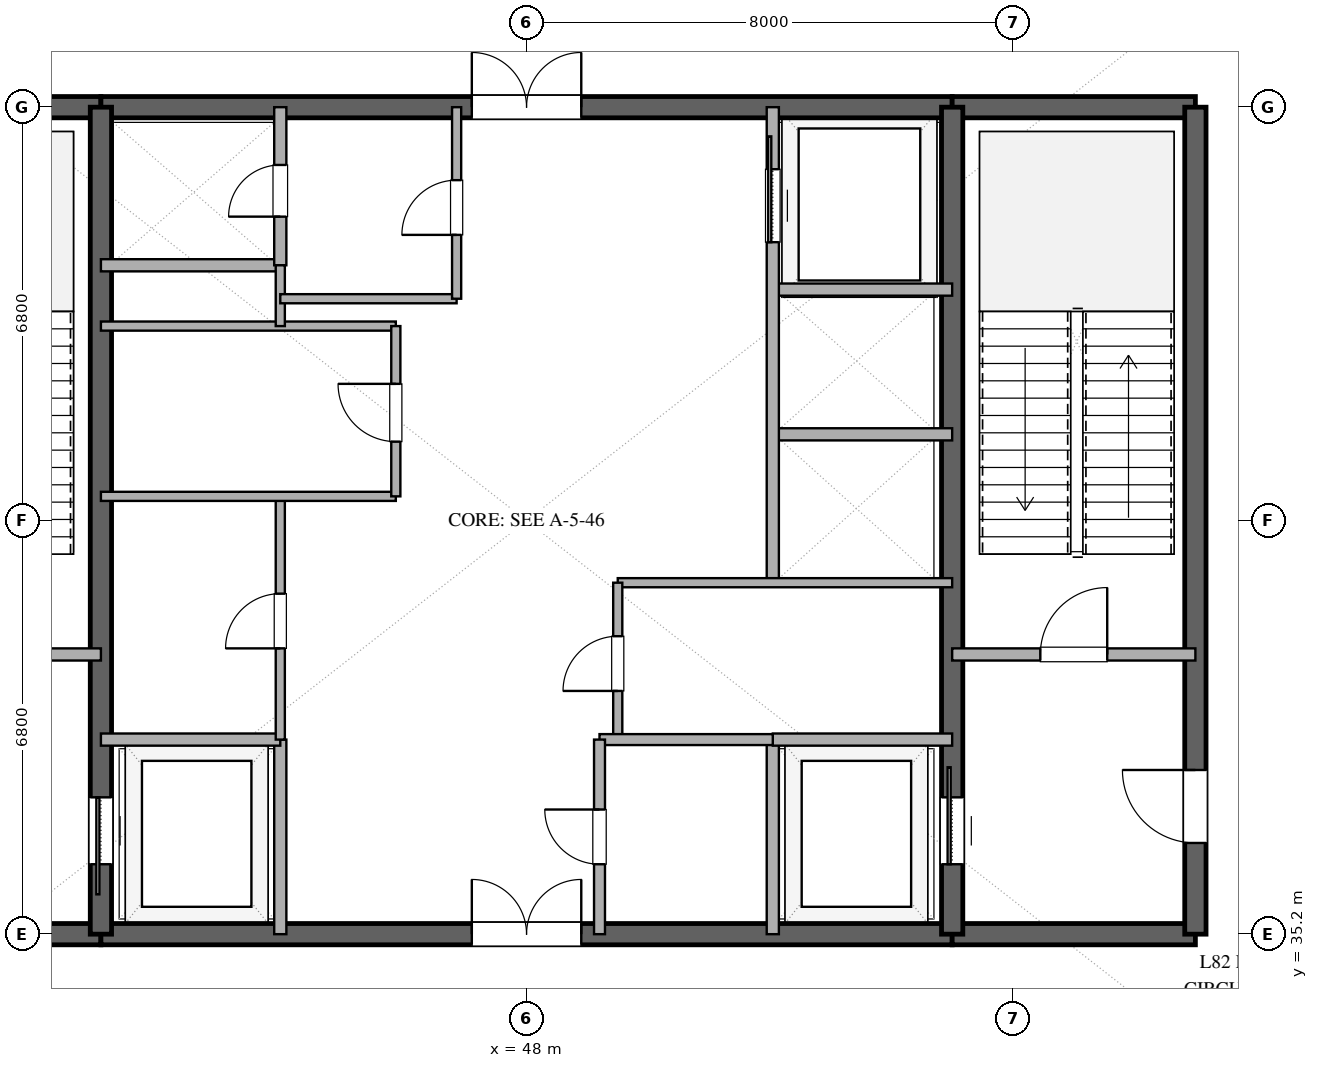
"""IFC4 building model, lengths in metres.
Left out: names, types, materials, properties, quantities, classifications, styles, units other than length and angle.
Written with IfcOpenShell. Run it as: python <this file> out.ifc"""

import sys

from ifc_helpers import new_model, si_unit, direction, frame, frame_2d, origin, place, context, subcontext, project, spatial, rectangle, extrude, element, fill, save


model = new_model("IFC4")
c1 = context("Model", 3, precision=1e-05, world=origin(), true_north=direction((0.0, 1.0)))
c2 = subcontext(c1, "Body", "Model", "MODEL_VIEW")
j1 = project(units=[si_unit("LENGTHUNIT", "METRE"), si_unit("PLANEANGLEUNIT", "RADIAN")], contexts=[c1])
p1 = place(None, origin())
s1 = spatial("IfcSite", under=j1, at=p1, CompositionType="ELEMENT")
p2 = place(p1, origin())
s2 = spatial("IfcBuilding", under=s1, at=p2, CompositionType="ELEMENT")
p3 = place(p2, frame((0.0, 0.0, 316.5)))
s3 = spatial("IfcBuildingStorey", under=s2, at=p3, CompositionType="ELEMENT", Elevation=316.5)
p4 = place(p3, frame((37.0, 35.2, 0.0), z_axis=(0.0, 0.0, 1.0), x_axis=(1.0, 0.0, 0.0)))
e1 = element("IfcWall", 1, at=p4, inside=s3, PredefinedType="SHEAR", context=c2, shape_type="SweptSolid", body=[
    extrude(rectangle(XDim=4.0, YDim=0.35, at=frame_2d((2.0, 0.0))), origin(), (0.0, 0.0, 1.0), 4.84),
])
p5 = place(p3, frame((41.0, 35.2, 0.0), z_axis=(0.0, 0.0, 1.0), x_axis=(1.0, 0.0, 0.0)))
e2 = element("IfcWall", 2, at=p5, inside=s3, PredefinedType="SHEAR", context=c2, shape_type="SweptSolid", body=[
    extrude(rectangle(XDim=14.0, YDim=0.35, at=frame_2d((7.0, 0.0))), origin(), (0.0, 0.0, 1.0), 4.84),
])
p6 = place(p5, frame((6.1, 0.0, 0.0)))
e3 = element("IfcOpeningElement", 3, at=p6, cuts=e2, PredefinedType="OPENING", context=c2, shape_type="SweptSolid", body=[
    extrude(rectangle(XDim=1.8, YDim=2.25, at=frame_2d((0.9, 1.125))), frame((0.0, 0.185, 0.0), z_axis=(0.0, -1.0, 0.0), x_axis=(1.0, 0.0, 0.0)), (0.0, 0.0, 1.0), 0.37),
])
for number, where, z_axis, x_axis in (
    (4, (55.0, 35.2, 0.0), (0.0, 0.0, 1.0), (1.0, 0.0, 0.0)),
    (5, (37.0, 48.8, 0.0), (0.0, 0.0, 1.0), (1.0, 0.0, 0.0)),
):
    element("IfcWall", number, at=place(p3, frame(where, z_axis=z_axis, x_axis=x_axis)), inside=s3, PredefinedType="SHEAR", context=c2, shape_type="SweptSolid", body=[
        extrude(rectangle(XDim=4.0, YDim=0.35, at=frame_2d((2.0, 0.0))), origin(), (0.0, 0.0, 1.0), 4.84),
    ])
p7 = place(p3, frame((41.0, 48.8, 0.0), z_axis=(0.0, 0.0, 1.0), x_axis=(1.0, 0.0, 0.0)))
e6 = element("IfcWall", 6, at=p7, inside=s3, PredefinedType="SHEAR", context=c2, shape_type="SweptSolid", body=[
    extrude(rectangle(XDim=14.0, YDim=0.35, at=frame_2d((7.0, 0.0))), origin(), (0.0, 0.0, 1.0), 4.84),
])
p8 = place(p7, frame((6.1, 0.0, 0.0)))
e7 = element("IfcOpeningElement", 7, at=p8, cuts=e6, PredefinedType="OPENING", context=c2, shape_type="SweptSolid", body=[
    extrude(rectangle(XDim=1.8, YDim=2.25, at=frame_2d((0.9, 1.125))), frame((0.0, 0.185, 0.0), z_axis=(0.0, -1.0, 0.0), x_axis=(1.0, 0.0, 0.0)), (0.0, 0.0, 1.0), 0.37),
])
p9 = place(p3, frame((55.0, 48.8, 0.0), z_axis=(0.0, 0.0, 1.0), x_axis=(1.0, 0.0, 0.0)))
e8 = element("IfcWall", 8, at=p9, inside=s3, PredefinedType="SHEAR", context=c2, shape_type="SweptSolid", body=[
    extrude(rectangle(XDim=4.0, YDim=0.35, at=frame_2d((2.0, 0.0))), origin(), (0.0, 0.0, 1.0), 4.84),
])
p10 = place(p3, frame((59.0, 35.2, 0.0), z_axis=(0.0, 0.0, 1.0), x_axis=(0.0, 1.0, 0.0)))
e9 = element("IfcWall", 9, at=p10, inside=s3, PredefinedType="SHEAR", context=c2, shape_type="SweptSolid", body=[
    extrude(rectangle(XDim=13.6, YDim=0.35, at=frame_2d((6.8, 0.0))), origin(), (0.0, 0.0, 1.0), 4.84),
])
p11 = place(p10, frame((1.5, 0.0, 0.0)))
e10 = element("IfcOpeningElement", 10, at=p11, cuts=e9, PredefinedType="OPENING", context=c2, shape_type="SweptSolid", body=[
    extrude(rectangle(XDim=1.2, YDim=2.15, at=frame_2d((0.6, 1.075))), frame((0.0, 0.185, 0.0), z_axis=(0.0, -1.0, 0.0), x_axis=(1.0, 0.0, 0.0)), (0.0, 0.0, 1.0), 0.37),
])
p12 = place(p3, frame((41.0, 35.2, 0.0), z_axis=(0.0, 0.0, 1.0), x_axis=(0.0, 1.0, 0.0)))
e11 = element("IfcWall", 11, at=p12, inside=s3, PredefinedType="SHEAR", context=c2, shape_type="SweptSolid", body=[
    extrude(rectangle(XDim=13.6, YDim=0.35, at=frame_2d((6.8, 0.0))), origin(), (0.0, 0.0, 1.0), 4.84),
])
p13 = place(p12, frame((1.15, 0.0, 0.0)))
e12 = element("IfcOpeningElement", 12, at=p13, cuts=e11, PredefinedType="OPENING", context=c2, shape_type="SweptSolid", body=[
    extrude(rectangle(XDim=1.1, YDim=2.2, at=frame_2d((0.55, 1.1))), frame((0.0, 0.185, 0.0), z_axis=(0.0, -1.0, 0.0), x_axis=(1.0, 0.0, 0.0)), (0.0, 0.0, 1.0), 0.37),
])
p14 = place(p3, frame((55.0, 35.2, 0.0), z_axis=(0.0, 0.0, 1.0), x_axis=(0.0, 1.0, 0.0)))
e13 = element("IfcWall", 13, at=p14, inside=s3, PredefinedType="SHEAR", context=c2, shape_type="SweptSolid", body=[
    extrude(rectangle(XDim=13.6, YDim=0.35, at=frame_2d((6.8, 0.0))), origin(), (0.0, 0.0, 1.0), 4.84),
])
p15 = place(p14, frame((1.15, 0.0, 0.0)))
e14 = element("IfcOpeningElement", 14, at=p15, cuts=e13, PredefinedType="OPENING", context=c2, shape_type="SweptSolid", body=[
    extrude(rectangle(XDim=1.1, YDim=2.2, at=frame_2d((0.55, 1.1))), frame((0.0, 0.185, 0.0), z_axis=(0.0, -1.0, 0.0), x_axis=(1.0, 0.0, 0.0)), (0.0, 0.0, 1.0), 0.37),
])
p16 = place(p3, frame((37.0, 39.8, 0.0), z_axis=(0.0, 0.0, 1.0), x_axis=(1.0, 0.0, 0.0)))
e15 = element("IfcWall", 15, at=p16, inside=s3, PredefinedType="SOLIDWALL", context=c2, shape_type="SweptSolid", body=[
    extrude(rectangle(XDim=4.0, YDim=0.2, at=frame_2d((2.0, 0.0))), origin(), (0.0, 0.0, 1.0), 4.19),
])
p17 = place(p16, frame((1.45, 0.0, 0.0)))
e16 = element("IfcOpeningElement", 16, at=p17, cuts=e15, PredefinedType="OPENING", context=c2, shape_type="SweptSolid", body=[
    extrude(rectangle(XDim=1.1, YDim=2.15, at=frame_2d((0.55, 1.075))), frame((0.0, 0.11, 0.0), z_axis=(0.0, -1.0, 0.0), x_axis=(1.0, 0.0, 0.0)), (0.0, 0.0, 1.0), 0.22),
])
p18 = place(p3, frame((55.0, 39.8, 0.0), z_axis=(0.0, 0.0, 1.0), x_axis=(1.0, 0.0, 0.0)))
e17 = element("IfcWall", 17, at=p18, inside=s3, PredefinedType="SOLIDWALL", context=c2, shape_type="SweptSolid", body=[
    extrude(rectangle(XDim=4.0, YDim=0.2, at=frame_2d((2.0, 0.0))), origin(), (0.0, 0.0, 1.0), 4.19),
])
p19 = place(p18, frame((1.45, 0.0, 0.0)))
e18 = element("IfcOpeningElement", 18, at=p19, cuts=e17, PredefinedType="OPENING", context=c2, shape_type="SweptSolid", body=[
    extrude(rectangle(XDim=1.1, YDim=2.15, at=frame_2d((0.55, 1.075))), frame((0.0, 0.11, 0.0), z_axis=(0.0, -1.0, 0.0), x_axis=(1.0, 0.0, 0.0)), (0.0, 0.0, 1.0), 0.22),
])
p20 = place(p3, frame((43.95, 35.2, 0.0), z_axis=(0.0, 0.0, 1.0), x_axis=(0.0, 1.0, 0.0)))
e19 = element("IfcWall", 19, at=p20, inside=s3, PredefinedType="SOLIDWALL", context=c2, shape_type="SweptSolid", body=[
    extrude(rectangle(XDim=3.2, YDim=0.2, at=frame_2d((1.6, 0.0))), origin(), (0.0, 0.0, 1.0), 4.19),
])
p21 = place(p3, frame((41.0, 38.4, 0.0), z_axis=(0.0, 0.0, 1.0), x_axis=(1.0, 0.0, 0.0)))
e20 = element("IfcWall", 20, at=p21, inside=s3, PredefinedType="SOLIDWALL", context=c2, shape_type="SweptSolid", body=[
    extrude(rectangle(XDim=2.95, YDim=0.2, at=frame_2d((1.475, 0.0))), origin(), (0.0, 0.0, 1.0), 4.19),
])
p22 = place(p3, frame((52.05, 35.2, 0.0), z_axis=(0.0, 0.0, 1.0), x_axis=(0.0, 1.0, 0.0)))
e21 = element("IfcWall", 21, at=p22, inside=s3, PredefinedType="SOLIDWALL", context=c2, shape_type="SweptSolid", body=[
    extrude(rectangle(XDim=3.2, YDim=0.2, at=frame_2d((1.6, 0.0))), origin(), (0.0, 0.0, 1.0), 4.19),
])
for number, where, z_axis, x_axis in (
    (22, (52.05, 38.4, 0.0), (0.0, 0.0, 1.0), (1.0, 0.0, 0.0)),
    (23, (41.0, 46.2, 0.0), (0.0, 0.0, 1.0), (1.0, 0.0, 0.0)),
):
    element("IfcWall", number, at=place(p3, frame(where, z_axis=z_axis, x_axis=x_axis)), inside=s3, PredefinedType="SOLIDWALL", context=c2, shape_type="SweptSolid", body=[
        extrude(rectangle(XDim=2.95, YDim=0.2, at=frame_2d((1.475, 0.0))), origin(), (0.0, 0.0, 1.0), 4.19),
    ])
p23 = place(p3, frame((43.95, 46.2, 0.0), z_axis=(0.0, 0.0, 1.0), x_axis=(0.0, 1.0, 0.0)))
e24 = element("IfcWall", 24, at=p23, inside=s3, PredefinedType="SOLIDWALL", context=c2, shape_type="SweptSolid", body=[
    extrude(rectangle(XDim=2.6, YDim=0.2, at=frame_2d((1.3, 0.0))), origin(), (0.0, 0.0, 1.0), 4.19),
])
p24 = place(p23, frame((0.8, 0.0, 0.0)))
e25 = element("IfcOpeningElement", 25, at=p24, cuts=e24, PredefinedType="OPENING", context=c2, shape_type="SweptSolid", body=[
    extrude(rectangle(XDim=0.85, YDim=2.15, at=frame_2d((0.425, 1.075))), frame((0.0, 0.11, 0.0), z_axis=(0.0, -1.0, 0.0), x_axis=(1.0, 0.0, 0.0)), (0.0, 0.0, 1.0), 0.22),
])
p25 = place(p3, frame((43.95, 38.4, 0.0), z_axis=(0.0, 0.0, 1.0), x_axis=(0.0, 1.0, 0.0)))
e26 = element("IfcWall", 26, at=p25, inside=s3, PredefinedType="PARTITIONING", context=c2, shape_type="SweptSolid", body=[
    extrude(rectangle(XDim=4.0, YDim=0.15, at=frame_2d((2.0, 0.0))), origin(), (0.0, 0.0, 1.0), 4.19),
])
p26 = place(p25, frame((1.5, 0.0, 0.0)))
e27 = element("IfcOpeningElement", 27, at=p26, cuts=e26, PredefinedType="OPENING", context=c2, shape_type="SweptSolid", body=[
    extrude(rectangle(XDim=0.9, YDim=2.15, at=frame_2d((0.45, 1.075))), frame((0.0, 0.085, 0.0), z_axis=(0.0, -1.0, 0.0), x_axis=(1.0, 0.0, 0.0)), (0.0, 0.0, 1.0), 0.17),
])
for number, where, z_axis, x_axis in (
    (28, (41.0, 42.4, 0.0), (0.0, 0.0, 1.0), (1.0, 0.0, 0.0)),
    (29, (41.0, 45.2, 0.0), (0.0, 0.0, 1.0), (1.0, 0.0, 0.0)),
):
    element("IfcWall", number, at=place(p3, frame(where, z_axis=z_axis, x_axis=x_axis)), inside=s3, PredefinedType="PARTITIONING", context=c2, shape_type="SweptSolid", body=[
        extrude(rectangle(XDim=4.85, YDim=0.15, at=frame_2d((2.425, 0.0))), origin(), (0.0, 0.0, 1.0), 4.19),
    ])
p27 = place(p3, frame((43.95, 45.2, 0.0), z_axis=(0.0, 0.0, 1.0), x_axis=(0.0, 1.0, 0.0)))
e30 = element("IfcWall", 30, at=p27, inside=s3, PredefinedType="PARTITIONING", context=c2, shape_type="SweptSolid", body=[
    extrude(rectangle(XDim=1.0, YDim=0.15, at=frame_2d((0.5, 0.0))), origin(), (0.0, 0.0, 1.0), 4.19),
])
p28 = place(p3, frame((45.85, 42.4, 0.0), z_axis=(0.0, 0.0, 1.0), x_axis=(0.0, 1.0, 0.0)))
e31 = element("IfcWall", 31, at=p28, inside=s3, PredefinedType="PARTITIONING", context=c2, shape_type="SweptSolid", body=[
    extrude(rectangle(XDim=2.8, YDim=0.15, at=frame_2d((1.4, 0.0))), origin(), (0.0, 0.0, 1.0), 4.19),
])
p29 = place(p28, frame((0.9, 0.0, 0.0)))
e32 = element("IfcOpeningElement", 32, at=p29, cuts=e31, PredefinedType="OPENING", context=c2, shape_type="SweptSolid", body=[
    extrude(rectangle(XDim=0.95, YDim=2.15, at=frame_2d((0.475, 1.075))), frame((0.0, 0.085, 0.0), z_axis=(0.0, -1.0, 0.0), x_axis=(1.0, 0.0, 0.0)), (0.0, 0.0, 1.0), 0.17),
])
for number, where, z_axis, x_axis in (
    (33, (52.05, 43.42, 0.0), (0.0, 0.0, 1.0), (1.0, 0.0, 0.0)),
    (34, (52.05, 45.8, 0.0), (0.0, 0.0, 1.0), (1.0, 0.0, 0.0)),
):
    element("IfcWall", number, at=place(p3, frame(where, z_axis=z_axis, x_axis=x_axis)), inside=s3, PredefinedType="SOLIDWALL", context=c2, shape_type="SweptSolid", body=[
        extrude(rectangle(XDim=2.95, YDim=0.2, at=frame_2d((1.475, 0.0))), origin(), (0.0, 0.0, 1.0), 4.19),
    ])
p30 = place(p3, frame((52.05, 40.98, 0.0), z_axis=(0.0, 0.0, 1.0), x_axis=(0.0, 1.0, 0.0)))
e35 = element("IfcWall", 35, at=p30, inside=s3, PredefinedType="SOLIDWALL", context=c2, shape_type="SweptSolid", body=[
    extrude(rectangle(XDim=7.82, YDim=0.2, at=frame_2d((3.91, 0.0))), origin(), (0.0, 0.0, 1.0), 4.19),
])
p31 = place(p30, frame((5.6, 0.0, 0.0)))
e36 = element("IfcOpeningElement", 36, at=p31, cuts=e35, PredefinedType="OPENING", context=c2, shape_type="SweptSolid", body=[
    extrude(rectangle(XDim=1.2, YDim=2.2, at=frame_2d((0.6, 1.1))), frame((0.0, 0.11, 0.0), z_axis=(0.0, -1.0, 0.0), x_axis=(1.0, 0.0, 0.0)), (0.0, 0.0, 1.0), 0.22),
])
p32 = place(p3, frame((49.5, 40.98, 0.0), z_axis=(0.0, 0.0, 1.0), x_axis=(1.0, 0.0, 0.0)))
e37 = element("IfcWall", 37, at=p32, inside=s3, PredefinedType="PARTITIONING", context=c2, shape_type="SweptSolid", body=[
    extrude(rectangle(XDim=5.5, YDim=0.15, at=frame_2d((2.75, 0.0))), origin(), (0.0, 0.0, 1.0), 4.19),
])
p33 = place(p3, frame((49.5, 38.4, 0.0), z_axis=(0.0, 0.0, 1.0), x_axis=(0.0, 1.0, 0.0)))
e38 = element("IfcWall", 38, at=p33, inside=s3, PredefinedType="PARTITIONING", context=c2, shape_type="SweptSolid", body=[
    extrude(rectangle(XDim=2.58, YDim=0.15, at=frame_2d((1.29, 0.0))), origin(), (0.0, 0.0, 1.0), 4.19),
])
p34 = place(p33, frame((0.8, 0.0, 0.0)))
e39 = element("IfcOpeningElement", 39, at=p34, cuts=e38, PredefinedType="OPENING", context=c2, shape_type="SweptSolid", body=[
    extrude(rectangle(XDim=0.9, YDim=2.15, at=frame_2d((0.45, 1.075))), frame((0.0, 0.085, 0.0), z_axis=(0.0, -1.0, 0.0), x_axis=(1.0, 0.0, 0.0)), (0.0, 0.0, 1.0), 0.17),
])
p35 = place(p3, frame((43.95, 45.65, 0.0), z_axis=(0.0, 0.0, 1.0), x_axis=(1.0, 0.0, 0.0)))
e40 = element("IfcWall", 40, at=p35, inside=s3, PredefinedType="PARTITIONING", context=c2, shape_type="SweptSolid", body=[
    extrude(rectangle(XDim=2.9, YDim=0.15, at=frame_2d((1.45, 0.0))), origin(), (0.0, 0.0, 1.0), 4.19),
])
p36 = place(p3, frame((46.85, 45.65, 0.0), z_axis=(0.0, 0.0, 1.0), x_axis=(0.0, 1.0, 0.0)))
e41 = element("IfcWall", 41, at=p36, inside=s3, PredefinedType="PARTITIONING", context=c2, shape_type="SweptSolid", body=[
    extrude(rectangle(XDim=3.15, YDim=0.15, at=frame_2d((1.575, 0.0))), origin(), (0.0, 0.0, 1.0), 4.19),
])
p37 = place(p36, frame((1.05, 0.0, 0.0)))
e42 = element("IfcOpeningElement", 42, at=p37, cuts=e41, PredefinedType="OPENING", context=c2, shape_type="SweptSolid", body=[
    extrude(rectangle(XDim=0.9, YDim=2.15, at=frame_2d((0.45, 1.075))), frame((0.0, 0.085, 0.0), z_axis=(0.0, -1.0, 0.0), x_axis=(1.0, 0.0, 0.0)), (0.0, 0.0, 1.0), 0.17),
])
p38 = place(p3, frame((49.2, 38.4, 0.0), z_axis=(0.0, 0.0, 1.0), x_axis=(1.0, 0.0, 0.0)))
e43 = element("IfcWall", 43, at=p38, inside=s3, PredefinedType="PLUMBINGWALL", context=c2, shape_type="SweptSolid", body=[
    extrude(rectangle(XDim=2.85, YDim=0.18, at=frame_2d((1.425, 0.0))), origin(), (0.0, 0.0, 1.0), 4.19),
])
p39 = place(p3, frame((49.2, 35.2, 0.0), z_axis=(0.0, 0.0, 1.0), x_axis=(0.0, 1.0, 0.0)))
e44 = element("IfcWall", 44, at=p39, inside=s3, PredefinedType="PLUMBINGWALL", context=c2, shape_type="SweptSolid", body=[
    extrude(rectangle(XDim=3.2, YDim=0.18, at=frame_2d((1.6, 0.0))), origin(), (0.0, 0.0, 1.0), 4.19),
])
p40 = place(p39, frame((1.15, 0.0, 0.0)))
e45 = element("IfcOpeningElement", 45, at=p40, cuts=e44, PredefinedType="OPENING", context=c2, shape_type="SweptSolid", body=[
    extrude(rectangle(XDim=0.9, YDim=2.1, at=frame_2d((0.45, 1.05))), frame((0.0, 0.1, 0.0), z_axis=(0.0, -1.0, 0.0), x_axis=(1.0, 0.0, 0.0)), (0.0, 0.0, 1.0), 0.2),
])
p41 = place(p13, origin())
e46 = element("IfcDoor", 46, at=p41, inside=s3, OperationType="SLIDING_TO_LEFT", PredefinedType="DOOR", context=c2, shape_type="SweptSolid", body=[
    extrude(rectangle(XDim=1.1, YDim=2.2, at=frame_2d((0.55, 1.1))), frame((0.0, 0.025, 0.0), z_axis=(0.0, -1.0, 0.0), x_axis=(1.0, 0.0, 0.0)), (0.0, 0.0, 1.0), 0.05),
])
fill(e12, e46)
p42 = place(p15, origin())
e47 = element("IfcDoor", 47, at=p42, inside=s3, OperationType="SLIDING_TO_RIGHT", PredefinedType="DOOR", context=c2, shape_type="SweptSolid", body=[
    extrude(rectangle(XDim=1.1, YDim=2.2, at=frame_2d((0.55, 1.1))), frame((0.0, 0.025, 0.0), z_axis=(0.0, -1.0, 0.0), x_axis=(1.0, 0.0, 0.0)), (0.0, 0.0, 1.0), 0.05),
])
fill(e14, e47)
p43 = place(p11, origin())
e48 = element("IfcDoor", 48, at=p43, inside=s3, OperationType="SINGLE_SWING_RIGHT", PredefinedType="DOOR", context=c2, shape_type="SweptSolid", body=[
    extrude(rectangle(XDim=1.2, YDim=2.15, at=frame_2d((0.6, 1.075))), frame((0.0, 0.025, 0.0), z_axis=(0.0, -1.0, 0.0), x_axis=(1.0, 0.0, 0.0)), (0.0, 0.0, 1.0), 0.05),
])
fill(e10, e48)
p44 = place(p6, origin())
e49 = element("IfcDoor", 49, at=p44, inside=s3, OperationType="DOUBLE_DOOR_SINGLE_SWING", PredefinedType="DOOR", context=c2, shape_type="SweptSolid", body=[
    extrude(rectangle(XDim=1.8, YDim=2.25, at=frame_2d((0.9, 1.125))), frame((0.0, 0.025, 0.0), z_axis=(0.0, -1.0, 0.0), x_axis=(1.0, 0.0, 0.0)), (0.0, 0.0, 1.0), 0.05),
])
fill(e3, e49)
p45 = place(p8, origin())
e50 = element("IfcDoor", 50, at=p45, inside=s3, OperationType="DOUBLE_DOOR_SINGLE_SWING", PredefinedType="DOOR", context=c2, shape_type="SweptSolid", body=[
    extrude(rectangle(XDim=1.8, YDim=2.25, at=frame_2d((0.9, 1.125))), frame((0.0, 0.025, 0.0), z_axis=(0.0, -1.0, 0.0), x_axis=(1.0, 0.0, 0.0)), (0.0, 0.0, 1.0), 0.05),
])
fill(e7, e50)
p46 = place(p19, origin())
e51 = element("IfcDoor", 51, at=p46, inside=s3, OperationType="SINGLE_SWING_RIGHT", PredefinedType="DOOR", context=c2, shape_type="SweptSolid", body=[
    extrude(rectangle(XDim=1.1, YDim=2.15, at=frame_2d((0.55, 1.075))), frame((0.0, 0.025, 0.0), z_axis=(0.0, -1.0, 0.0), x_axis=(1.0, 0.0, 0.0)), (0.0, 0.0, 1.0), 0.05),
])
fill(e18, e51)
p47 = place(p24, origin())
e52 = element("IfcDoor", 52, at=p47, inside=s3, OperationType="SINGLE_SWING_LEFT", PredefinedType="DOOR", context=c2, shape_type="SweptSolid", body=[
    extrude(rectangle(XDim=0.85, YDim=2.15, at=frame_2d((0.425, 1.075))), frame((0.0, 0.025, 0.0), z_axis=(0.0, -1.0, 0.0), x_axis=(1.0, 0.0, 0.0)), (0.0, 0.0, 1.0), 0.05),
])
fill(e25, e52)
p48 = place(p26, origin())
e53 = element("IfcDoor", 53, at=p48, inside=s3, OperationType="SINGLE_SWING_LEFT", PredefinedType="DOOR", context=c2, shape_type="SweptSolid", body=[
    extrude(rectangle(XDim=0.9, YDim=2.15, at=frame_2d((0.45, 1.075))), frame((0.0, 0.025, 0.0), z_axis=(0.0, -1.0, 0.0), x_axis=(1.0, 0.0, 0.0)), (0.0, 0.0, 1.0), 0.05),
])
fill(e27, e53)
p49 = place(p29, origin())
e54 = element("IfcDoor", 54, at=p49, inside=s3, OperationType="SINGLE_SWING_RIGHT", PredefinedType="DOOR", context=c2, shape_type="SweptSolid", body=[
    extrude(rectangle(XDim=0.95, YDim=2.15, at=frame_2d((0.475, 1.075))), frame((0.0, 0.025, 0.0), z_axis=(0.0, -1.0, 0.0), x_axis=(1.0, 0.0, 0.0)), (0.0, 0.0, 1.0), 0.05),
])
fill(e32, e54)
p50 = place(p31, origin())
e55 = element("IfcDoor", 55, at=p50, inside=s3, OperationType="SLIDING_TO_RIGHT", PredefinedType="DOOR", context=c2, shape_type="SweptSolid", body=[
    extrude(rectangle(XDim=1.2, YDim=2.2, at=frame_2d((0.6, 1.1))), frame((0.0, 0.025, 0.0), z_axis=(0.0, -1.0, 0.0), x_axis=(1.0, 0.0, 0.0)), (0.0, 0.0, 1.0), 0.05),
])
fill(e36, e55)
p51 = place(p34, origin())
e56 = element("IfcDoor", 56, at=p51, inside=s3, OperationType="SINGLE_SWING_LEFT", PredefinedType="DOOR", context=c2, shape_type="SweptSolid", body=[
    extrude(rectangle(XDim=0.9, YDim=2.15, at=frame_2d((0.45, 1.075))), frame((0.0, 0.025, 0.0), z_axis=(0.0, -1.0, 0.0), x_axis=(1.0, 0.0, 0.0)), (0.0, 0.0, 1.0), 0.05),
])
fill(e39, e56)
p52 = place(p37, origin())
e57 = element("IfcDoor", 57, at=p52, inside=s3, OperationType="SINGLE_SWING_LEFT", PredefinedType="DOOR", context=c2, shape_type="SweptSolid", body=[
    extrude(rectangle(XDim=0.9, YDim=2.15, at=frame_2d((0.45, 1.075))), frame((0.0, 0.025, 0.0), z_axis=(0.0, -1.0, 0.0), x_axis=(1.0, 0.0, 0.0)), (0.0, 0.0, 1.0), 0.05),
])
fill(e42, e57)
p53 = place(p40, origin())
e58 = element("IfcDoor", 58, at=p53, inside=s3, OperationType="SINGLE_SWING_RIGHT", PredefinedType="DOOR", context=c2, shape_type="SweptSolid", body=[
    extrude(rectangle(XDim=0.9, YDim=2.1, at=frame_2d((0.45, 1.05))), frame((0.0, 0.025, 0.0), z_axis=(0.0, -1.0, 0.0), x_axis=(1.0, 0.0, 0.0)), (0.0, 0.0, 1.0), 0.05),
])
fill(e45, e58)
save(model, sys.argv[1])
